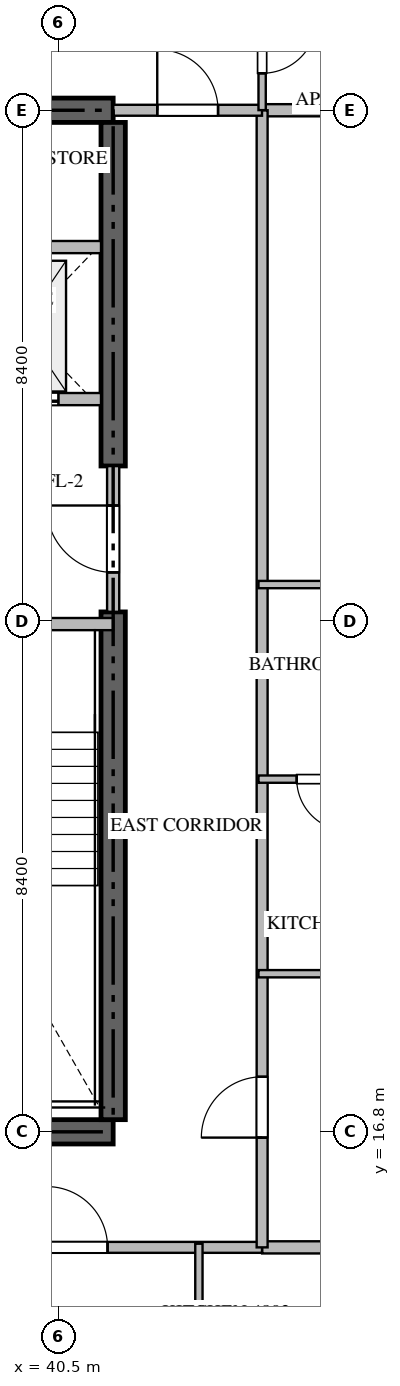
"""IFC4 building model, lengths in metres.
Left out: names, types, materials, properties, quantities, classifications, styles, units other than length and angle.
Written with IfcOpenShell. Run it as: python <this file> out.ifc"""

import sys

from ifc_helpers import new_model, si_unit, direction, frame, frame_2d, origin, place, context, subcontext, project, spatial, rectangle, extrude, source, transform, mapped, element, fill, save


model = new_model("IFC4")
c1 = context("Model", 3, precision=1e-05, world=origin(), true_north=direction((0.0, 1.0)))
c2 = subcontext(c1, "Body", "Model", "MODEL_VIEW")
j1 = project(units=[si_unit("LENGTHUNIT", "METRE"), si_unit("PLANEANGLEUNIT", "RADIAN")], contexts=[c1])
p1 = place(None, origin())
s1 = spatial("IfcSite", under=j1, at=p1, CompositionType="ELEMENT")
p2 = place(p1, origin())
s2 = spatial("IfcBuilding", under=s1, at=p2, CompositionType="ELEMENT")
p3 = place(p2, frame((0.0, 0.0, 191.4)))
s3 = spatial("IfcBuildingStorey", under=s2, at=p3, CompositionType="ELEMENT", Elevation=191.4)
for number, where, z_axis, x_axis in (
    (1, (23.4, 16.8, -0.26), (0.0, 0.0, 1.0), (1.0, 0.0, 0.0)),
    (2, (41.4, 33.6, -0.26), (0.0, 0.0, 1.0), (-1.0, 0.0, 0.0)),
):
    element("IfcWall", number, at=place(p3, frame(where, z_axis=z_axis, x_axis=x_axis)), inside=s3, PredefinedType="SHEAR", context=c2, shape_type="SweptSolid", body=[
        extrude(rectangle(XDim=18.0, YDim=0.4, at=frame_2d((9.0, 0.0))), origin(), (0.0, 0.0, 1.0), 3.748),
    ])
p4 = place(p3, frame((41.4, 17.0, -0.26), z_axis=(0.0, 0.0, 1.0), x_axis=(0.0, 1.0, 0.0)))
e3 = element("IfcWall", 3, at=p4, inside=s3, PredefinedType="SHEAR", context=c2, shape_type="SweptSolid", body=[
    extrude(rectangle(XDim=8.35, YDim=0.4, at=frame_2d((4.175, 0.0))), origin(), (0.0, 0.0, 1.0), 3.748),
])
p5 = place(p3, frame((41.4, 27.75, -0.26), z_axis=(0.0, 0.0, 1.0), x_axis=(0.0, 1.0, 0.0)))
e4 = element("IfcWall", 4, at=p5, inside=s3, PredefinedType="SHEAR", context=c2, shape_type="SweptSolid", body=[
    extrude(rectangle(XDim=5.65, YDim=0.4, at=frame_2d((2.825, 0.0))), origin(), (0.0, 0.0, 1.0), 3.748),
])
p6 = place(p3, frame((36.95, 25.15, 0.0), z_axis=(0.0, 0.0, 1.0), x_axis=(1.0, 0.0, 0.0)))
e5 = element("IfcWall", 5, at=p6, inside=s3, PredefinedType="STANDARD", context=c2, shape_type="SweptSolid", body=[
    extrude(rectangle(XDim=4.45, YDim=0.2, at=frame_2d((2.225, 0.0))), origin(), (0.0, 0.0, 1.0), 3.49),
])
p7 = place(p6, frame((1.65, 0.0, 0.0)))
e6 = element("IfcOpeningElement", 6, at=p7, cuts=e5, PredefinedType="OPENING", context=c2, shape_type="SweptSolid", body=[
    extrude(rectangle(XDim=1.1, YDim=2.15, at=frame_2d((0.55, 1.075))), frame((0.0, 0.11, 0.0), z_axis=(0.0, -1.0, 0.0), x_axis=(1.0, 0.0, 0.0)), (0.0, 0.0, 1.0), 0.22),
])
p8 = place(p3, frame((38.75, 28.85, 0.0), z_axis=(0.0, 0.0, 1.0), x_axis=(1.0, 0.0, 0.0)))
e7 = element("IfcWall", 7, at=p8, inside=s3, PredefinedType="STANDARD", context=c2, shape_type="SweptSolid", body=[
    extrude(rectangle(XDim=2.45, YDim=0.2, at=frame_2d((1.225, 0.0))), origin(), (0.0, 0.0, 1.0), 3.49),
])
p9 = place(p8, frame((0.55, 0.0, 0.0)))
e8 = element("IfcOpeningElement", 8, at=p9, cuts=e7, PredefinedType="OPENING", context=c2, shape_type="SweptSolid", body=[
    extrude(rectangle(XDim=1.2, YDim=2.2, at=frame_2d((0.6, 1.1))), frame((0.0, 0.11, 0.0), z_axis=(0.0, -1.0, 0.0), x_axis=(1.0, 0.0, 0.0)), (0.0, 0.0, 1.0), 0.22),
])
p10 = place(p3, frame((38.75, 31.35, 0.0), z_axis=(0.0, 0.0, 1.0), x_axis=(1.0, 0.0, 0.0)))
e9 = element("IfcWall", 9, at=p10, inside=s3, PredefinedType="STANDARD", context=c2, shape_type="SweptSolid", body=[
    extrude(rectangle(XDim=2.45, YDim=0.2, at=frame_2d((1.225, 0.0))), origin(), (0.0, 0.0, 1.0), 3.49),
])
p11 = place(p3, frame((41.4, 25.352, 0.0), z_axis=(0.0, 0.0, 1.0), x_axis=(0.0, 1.0, 0.0)))
e10 = element("IfcWall", 10, at=p11, inside=s3, PredefinedType="STANDARD", context=c2, shape_type="SweptSolid", body=[
    extrude(rectangle(XDim=2.396, YDim=0.2, at=frame_2d((1.198, 0.0))), origin(), (0.0, 0.0, 1.0), 3.49),
])
p12 = place(p11, frame((0.648, 0.0, 0.0)))
e11 = element("IfcOpeningElement", 11, at=p12, cuts=e10, PredefinedType="OPENING", context=c2, shape_type="SweptSolid", body=[
    extrude(rectangle(XDim=1.1, YDim=2.15, at=frame_2d((0.55, 1.075))), frame((0.0, 0.11, 0.0), z_axis=(0.0, -1.0, 0.0), x_axis=(1.0, 0.0, 0.0)), (0.0, 0.0, 1.0), 0.22),
])
for number, where, z_axis, x_axis in (
    (12, (43.85, 14.9, 0.0), (0.0, 0.0, 1.0), (1.0, 0.0, 0.0)),
    (13, (43.85, 33.6, 0.0), (0.0, 0.0, 1.0), (1.0, 0.0, 0.0)),
):
    element("IfcWall", number, at=place(p3, frame(where, z_axis=z_axis, x_axis=x_axis)), inside=s3, PredefinedType="PARTITIONING", context=c2, shape_type="SweptSolid", body=[
        extrude(rectangle(XDim=13.068, YDim=0.2, at=frame_2d((6.534, 0.0))), origin(), (0.0, 0.0, 1.0), 3.49),
    ])
p13 = place(p3, frame((20.952, 14.9, 0.0), z_axis=(0.0, 0.0, 1.0), x_axis=(1.0, 0.0, 0.0)))
e14 = element("IfcWall", 14, at=p13, inside=s3, PredefinedType="PARTITIONING", context=c2, shape_type="SweptSolid", body=[
    extrude(rectangle(XDim=22.896, YDim=0.18, at=frame_2d((11.448, 0.0))), origin(), (0.0, 0.0, 1.0), 3.49),
])
p14 = place(p13, frame((2.387, 0.0, 0.0)))
e15 = element("IfcOpeningElement", 15, at=p14, cuts=e14, PredefinedType="OPENING", context=c2, shape_type="SweptSolid", body=[
    extrude(rectangle(XDim=1.0, YDim=2.15, at=frame_2d((0.5, 1.075))), frame((0.0, 0.1, 0.0), z_axis=(0.0, -1.0, 0.0), x_axis=(1.0, 0.0, 0.0)), (0.0, 0.0, 1.0), 0.2),
])
p15 = place(p13, frame((14.867, 0.0, 0.0)))
e16 = element("IfcOpeningElement", 16, at=p15, cuts=e14, PredefinedType="OPENING", context=c2, shape_type="SweptSolid", body=[
    extrude(rectangle(XDim=1.0, YDim=2.15, at=frame_2d((0.5, 1.075))), frame((0.0, 0.1, 0.0), z_axis=(0.0, -1.0, 0.0), x_axis=(1.0, 0.0, 0.0)), (0.0, 0.0, 1.0), 0.2),
])
p16 = place(p13, frame((19.356, 0.0, 0.0)))
e17 = element("IfcOpeningElement", 17, at=p16, cuts=e14, PredefinedType="OPENING", context=c2, shape_type="SweptSolid", body=[
    extrude(rectangle(XDim=1.0, YDim=2.15, at=frame_2d((0.5, 1.075))), frame((0.0, 0.1, 0.0), z_axis=(0.0, -1.0, 0.0), x_axis=(1.0, 0.0, 0.0)), (0.0, 0.0, 1.0), 0.2),
])
p17 = place(p3, frame((43.85, 14.9, 0.0), z_axis=(0.0, 0.0, 1.0), x_axis=(0.0, 1.0, 0.0)))
e18 = element("IfcWall", 18, at=p17, inside=s3, PredefinedType="PARTITIONING", context=c2, shape_type="SweptSolid", body=[
    extrude(rectangle(XDim=18.7, YDim=0.18, at=frame_2d((9.35, 0.0))), origin(), (0.0, 0.0, 1.0), 3.49),
])
p18 = place(p17, frame((1.805, 0.0, 0.0)))
e19 = element("IfcOpeningElement", 19, at=p18, cuts=e18, PredefinedType="OPENING", context=c2, shape_type="SweptSolid", body=[
    extrude(rectangle(XDim=1.0, YDim=2.15, at=frame_2d((0.5, 1.075))), frame((0.0, 0.1, 0.0), z_axis=(0.0, -1.0, 0.0), x_axis=(1.0, 0.0, 0.0)), (0.0, 0.0, 1.0), 0.2),
])
p19 = place(p3, frame((41.402, 33.6, 0.0), z_axis=(0.0, 0.0, 1.0), x_axis=(1.0, 0.0, 0.0)))
e20 = element("IfcWall", 20, at=p19, inside=s3, PredefinedType="PARTITIONING", context=c2, shape_type="SweptSolid", body=[
    extrude(rectangle(XDim=2.446, YDim=0.18, at=frame_2d((1.223, 0.0))), origin(), (0.0, 0.0, 1.0), 3.49),
])
p20 = place(p19, frame((0.723, 0.0, 0.0)))
e21 = element("IfcOpeningElement", 21, at=p20, cuts=e20, PredefinedType="OPENING", context=c2, shape_type="SweptSolid", body=[
    extrude(rectangle(XDim=1.0, YDim=2.15, at=frame_2d((0.5, 1.075))), frame((0.0, 0.1, 0.0), z_axis=(0.0, -1.0, 0.0), x_axis=(1.0, 0.0, 0.0)), (0.0, 0.0, 1.0), 0.2),
])
p21 = place(p3, frame((42.81, 12.15, 0.0), z_axis=(0.0, 0.0, 1.0), x_axis=(0.0, 1.0, 0.0)))
e22 = element("IfcWall", 22, at=p21, inside=s3, PredefinedType="PARTITIONING", context=c2, shape_type="SweptSolid", body=[
    extrude(rectangle(XDim=2.81, YDim=0.12, at=frame_2d((1.405, 0.0))), origin(), (0.0, 0.0, 1.0), 3.49),
])
p22 = place(p3, frame((43.85, 35.75, 0.0), z_axis=(0.0, 0.0, 1.0), x_axis=(0.0, -1.0, 0.0)))
e23 = element("IfcWall", 23, at=p22, inside=s3, PredefinedType="PARTITIONING", context=c2, shape_type="SweptSolid", body=[
    extrude(rectangle(XDim=2.148, YDim=0.12, at=frame_2d((1.074, 0.0))), origin(), (0.0, 0.0, 1.0), 3.49),
])
p23 = place(p22, frame((0.642, 0.0, 0.0)))
e24 = element("IfcOpeningElement", 24, at=p23, cuts=e23, PredefinedType="OPENING", context=c2, shape_type="SweptSolid", body=[
    extrude(rectangle(XDim=0.9, YDim=2.1, at=frame_2d((0.45, 1.05))), frame((0.0, 0.07, 0.0), z_axis=(0.0, -1.0, 0.0), x_axis=(1.0, 0.0, 0.0)), (0.0, 0.0, 1.0), 0.14),
])
p24 = place(p3, frame((46.6, 19.4, 0.0), z_axis=(0.0, 0.0, 1.0), x_axis=(-1.0, 0.0, 0.0)))
e25 = element("IfcWall", 25, at=p24, inside=s3, PredefinedType="PARTITIONING", context=c2, shape_type="SweptSolid", body=[
    extrude(rectangle(XDim=2.81, YDim=0.12, at=frame_2d((1.405, 0.0))), origin(), (0.0, 0.0, 1.0), 3.49),
])
p25 = place(p3, frame((45.9, 25.8, 0.0), z_axis=(0.0, 0.0, 1.0), x_axis=(-1.0, 0.0, 0.0)))
e26 = element("IfcWall", 26, at=p25, inside=s3, PredefinedType="PARTITIONING", context=c2, shape_type="SweptSolid", body=[
    extrude(rectangle(XDim=2.11, YDim=0.12, at=frame_2d((1.055, 0.0))), origin(), (0.0, 0.0, 1.0), 3.49),
])
p26 = place(p3, frame((45.898, 22.6, 0.0), z_axis=(0.0, 0.0, 1.0), x_axis=(-1.0, 0.0, 0.0)))
e27 = element("IfcWall", 27, at=p26, inside=s3, PredefinedType="PARTITIONING", context=c2, shape_type="SweptSolid", body=[
    extrude(rectangle(XDim=2.108, YDim=0.12, at=frame_2d((1.054, 0.0))), origin(), (0.0, 0.0, 1.0), 3.49),
])
p27 = place(p26, frame((0.629, 0.0, 0.0)))
e28 = element("IfcOpeningElement", 28, at=p27, cuts=e27, PredefinedType="OPENING", context=c2, shape_type="SweptSolid", body=[
    extrude(rectangle(XDim=0.85, YDim=2.1, at=frame_2d((0.425, 1.05))), frame((0.0, 0.07, 0.0), z_axis=(0.0, -1.0, 0.0), x_axis=(1.0, 0.0, 0.0)), (0.0, 0.0, 1.0), 0.14),
])
m1 = source(origin(), c2, "Body", "SweptSolid", [
    extrude(rectangle(XDim=1.2, YDim=2.2, at=frame_2d((0.6, 1.1))), frame((0.0, 0.025, 0.0), z_axis=(0.0, -1.0, 0.0), x_axis=(1.0, 0.0, 0.0)), (0.0, 0.0, 1.0), 0.05),
])
p28 = place(p9, origin())
e29 = element("IfcDoor", 29, at=p28, inside=s3, OperationType="DOUBLE_DOOR_SLIDING", PredefinedType="DOOR", context=c2, shape_type="MappedRepresentation", body=[
    mapped(m1, transform((0.0, 0.0, 0.0), scale=1.0)),
])
fill(e8, e29)
m2 = source(origin(), c2, "Body", "SweptSolid", [
    extrude(rectangle(XDim=1.1, YDim=2.15, at=frame_2d((0.55, 1.075))), frame((0.0, 0.025, 0.0), z_axis=(0.0, -1.0, 0.0), x_axis=(1.0, 0.0, 0.0)), (0.0, 0.0, 1.0), 0.05),
])
p29 = place(p12, origin())
e30 = element("IfcDoor", 30, at=p29, inside=s3, OperationType="SINGLE_SWING_RIGHT", PredefinedType="DOOR", context=c2, shape_type="MappedRepresentation", body=[
    mapped(m2, transform((0.0, 0.0, 0.0), scale=1.0)),
])
fill(e11, e30)
m3 = source(origin(), c2, "Body", "SweptSolid", [
    extrude(rectangle(XDim=1.0, YDim=2.15, at=frame_2d((0.5, 1.075))), frame((0.0, 0.025, 0.0), z_axis=(0.0, -1.0, 0.0), x_axis=(1.0, 0.0, 0.0)), (0.0, 0.0, 1.0), 0.05),
])
p30 = place(p16, origin())
e31 = element("IfcDoor", 31, at=p30, inside=s3, OperationType="SINGLE_SWING_LEFT", PredefinedType="DOOR", context=c2, shape_type="MappedRepresentation", body=[
    mapped(m3, transform((0.0, 0.0, 0.0), scale=1.0)),
])
fill(e17, e31)
p31 = place(p18, origin())
e32 = element("IfcDoor", 32, at=p31, inside=s3, OperationType="SINGLE_SWING_LEFT", PredefinedType="DOOR", context=c2, shape_type="MappedRepresentation", body=[
    mapped(m3, transform((0.0, 0.0, 0.0), scale=1.0)),
])
fill(e19, e32)
p32 = place(p20, origin())
e33 = element("IfcDoor", 33, at=p32, inside=s3, OperationType="SINGLE_SWING_LEFT", PredefinedType="DOOR", context=c2, shape_type="MappedRepresentation", body=[
    mapped(m3, transform((0.0, 0.0, 0.0), scale=1.0)),
])
fill(e21, e33)
m4 = source(origin(), c2, "Body", "SweptSolid", [
    extrude(rectangle(XDim=0.9, YDim=2.1, at=frame_2d((0.45, 1.05))), frame((0.0, 0.025, 0.0), z_axis=(0.0, -1.0, 0.0), x_axis=(1.0, 0.0, 0.0)), (0.0, 0.0, 1.0), 0.05),
])
p33 = place(p23, origin())
e34 = element("IfcDoor", 34, at=p33, inside=s3, OperationType="SINGLE_SWING_LEFT", PredefinedType="DOOR", context=c2, shape_type="MappedRepresentation", body=[
    mapped(m4, transform((0.0, 0.0, 0.0), scale=1.0)),
])
fill(e24, e34)
m5 = source(origin(), c2, "Body", "SweptSolid", [
    extrude(rectangle(XDim=0.85, YDim=2.1, at=frame_2d((0.425, 1.05))), frame((0.0, 0.025, 0.0), z_axis=(0.0, -1.0, 0.0), x_axis=(1.0, 0.0, 0.0)), (0.0, 0.0, 1.0), 0.05),
])
p34 = place(p27, origin())
e35 = element("IfcDoor", 35, at=p34, inside=s3, OperationType="SINGLE_SWING_LEFT", PredefinedType="DOOR", context=c2, shape_type="MappedRepresentation", body=[
    mapped(m5, transform((0.0, 0.0, 0.0), scale=1.0)),
])
fill(e28, e35)
save(model, sys.argv[1])
